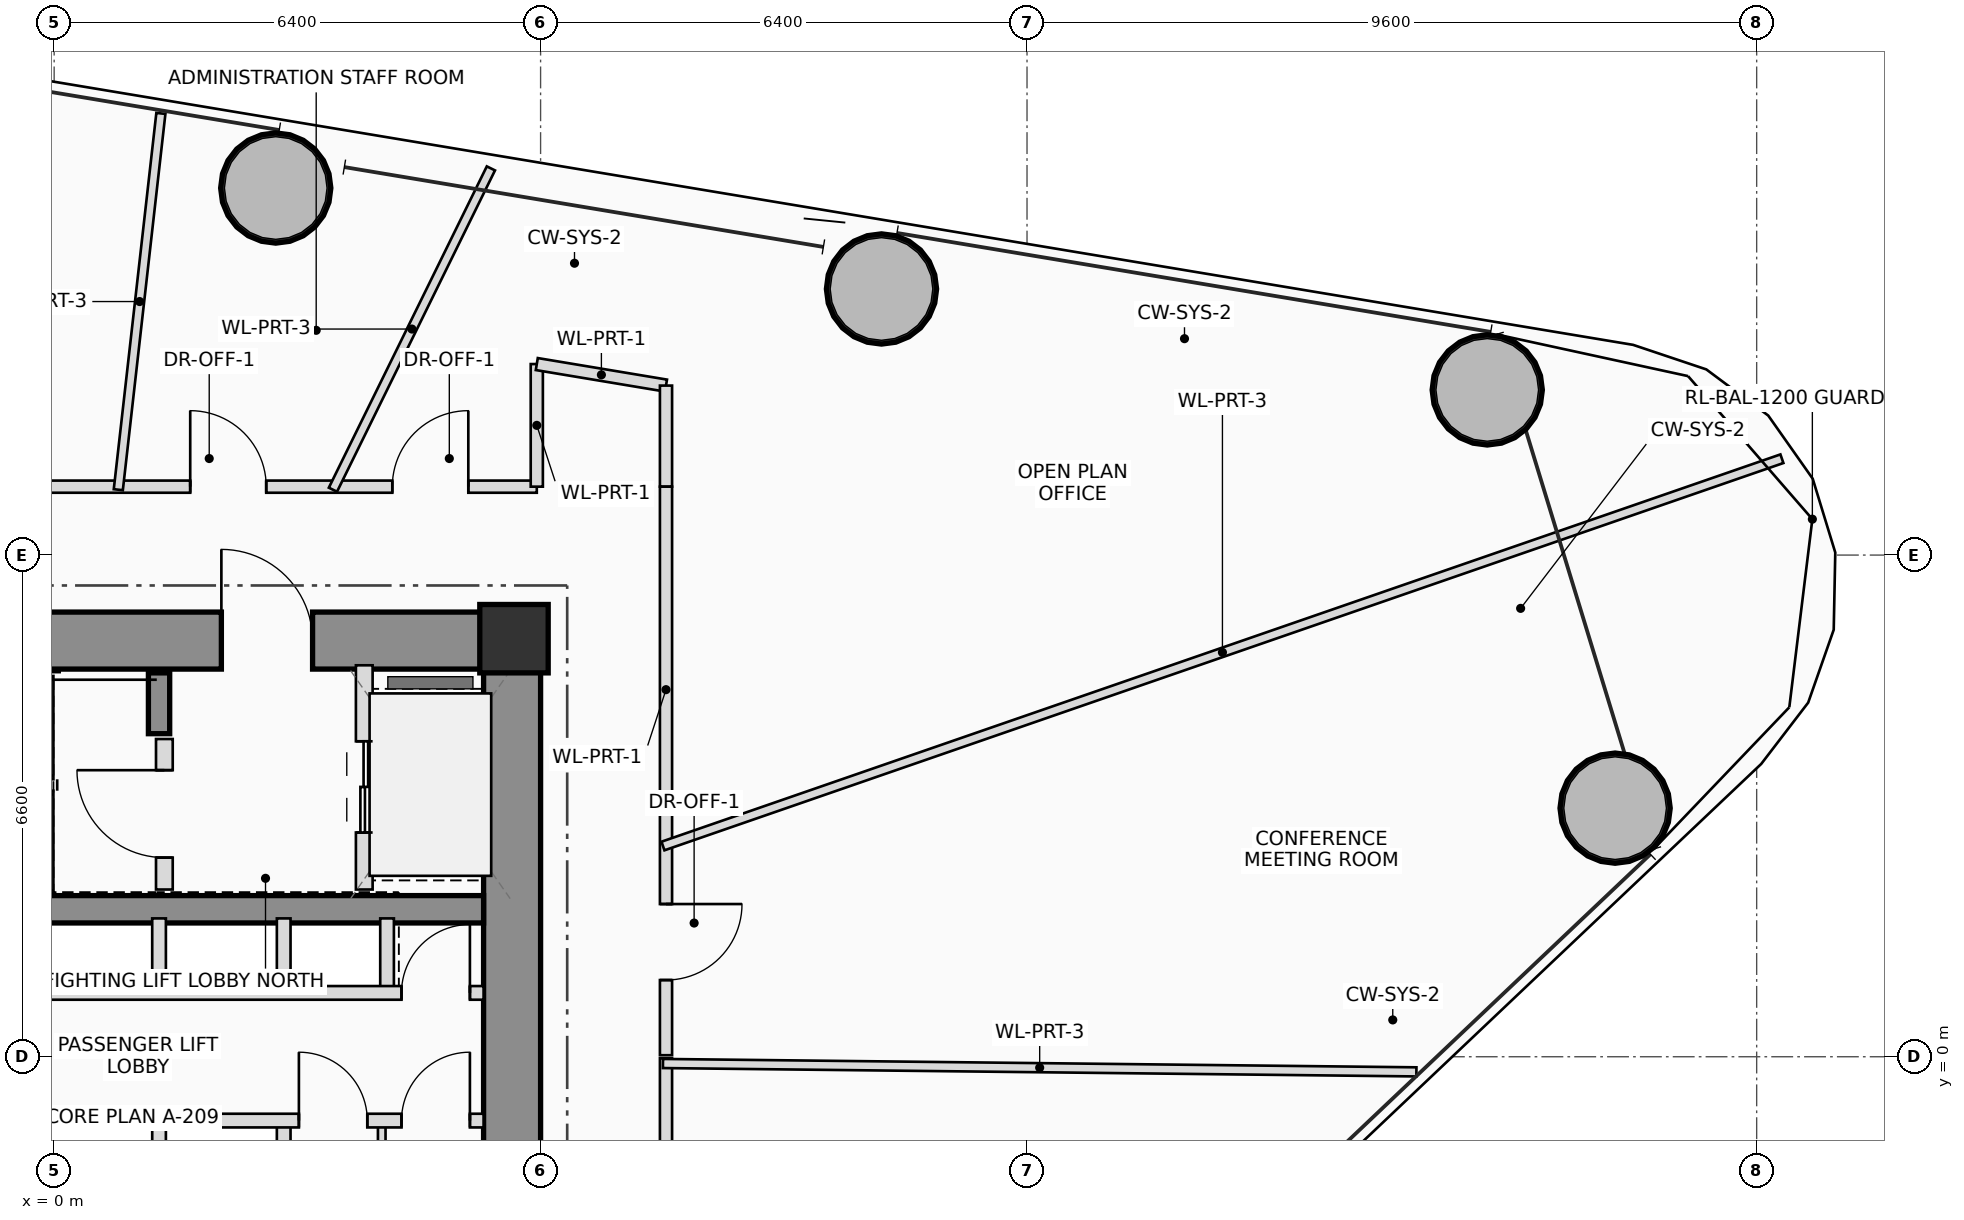
"""IFC4 building model, lengths in metres.
Left out: names, types, materials, properties, quantities, classifications, styles, units other than length and angle.
Written with IfcOpenShell. Run it as: python <this file> out.ifc"""

import sys

from ifc_helpers import new_model, si_unit, direction, frame, frame_2d, origin, origin_2d, place, context, subcontext, project, spatial, rectangle, hollow_circle, extrude, source, transform, mapped, element, fill, save


model = new_model("IFC4")
c1 = context("Model", 3, precision=1e-05, world=origin(), true_north=direction((0.0, 1.0)))
c2 = subcontext(c1, "Body", "Model", "MODEL_VIEW")
j1 = project(units=[si_unit("LENGTHUNIT", "METRE"), si_unit("PLANEANGLEUNIT", "RADIAN")], contexts=[c1])
p1 = place(None, origin())
s1 = spatial("IfcSite", under=j1, at=p1, CompositionType="ELEMENT")
p2 = place(p1, origin())
s2 = spatial("IfcBuilding", under=s1, at=p2, CompositionType="ELEMENT")
p3 = place(p2, frame((0.0, 0.0, 89.9)))
s3 = spatial("IfcBuildingStorey", under=s2, at=p3, CompositionType="ELEMENT", Elevation=89.9)
m1 = source(origin(), c2, "Body", "SweptSolid", [
    extrude(rectangle(XDim=0.9, YDim=0.9, at=origin_2d()), origin(), (0.0, 0.0, 1.0), 3.75),
])
p4 = place(p3, frame((6.05, 5.5, 0.0), z_axis=(0.0, 0.0, 1.0), x_axis=(1.0, 0.0, 0.0)))
e1 = element("IfcColumn", 1, at=p4, inside=s3, PredefinedType="COLUMN", context=c2, shape_type="MappedRepresentation", body=[
    mapped(m1, transform((0.0, 0.0, 0.0), scale=1.0)),
])
p5 = place(p3, frame((-6.4, 5.475, 0.0), z_axis=(0.0, 0.0, 1.0), x_axis=(1.0, 0.0, 0.0)))
e2 = element("IfcWall", 2, at=p5, inside=s3, PredefinedType="SHEAR", context=c2, shape_type="SweptSolid", body=[
    extrude(rectangle(XDim=12.8, YDim=0.75, at=frame_2d((6.4, 0.0))), origin(), (0.0, 0.0, 1.0), 3.75),
])
p6 = place(p5, frame((8.6, 0.0, 0.0)))
e3 = element("IfcOpeningElement", 3, at=p6, cuts=e2, PredefinedType="OPENING", context=c2, shape_type="SweptSolid", body=[
    extrude(rectangle(XDim=1.2, YDim=2.2, at=frame_2d((0.6, 1.1))), frame((0.0, 0.385, 0.0), z_axis=(0.0, -1.0, 0.0), x_axis=(1.0, 0.0, 0.0)), (0.0, 0.0, 1.0), 0.77),
])
p7 = place(p3, frame((6.025, -5.1, 0.0), z_axis=(0.0, 0.0, 1.0), x_axis=(0.0, 1.0, 0.0)))
e4 = element("IfcWall", 4, at=p7, inside=s3, PredefinedType="SHEAR", context=c2, shape_type="SweptSolid", body=[
    extrude(rectangle(XDim=10.2, YDim=0.75, at=frame_2d((5.1, 0.0))), origin(), (0.0, 0.0, 1.0), 3.75),
])
p8 = place(p3, frame((-5.65, 1.94, 0.0), z_axis=(0.0, 0.0, 1.0), x_axis=(1.0, 0.0, 0.0)))
e5 = element("IfcWall", 5, at=p8, inside=s3, PredefinedType="SHEAR", context=c2, shape_type="SweptSolid", body=[
    extrude(rectangle(XDim=11.3, YDim=0.36, at=frame_2d((5.65, 0.0))), origin(), (0.0, 0.0, 1.0), 3.75),
])
p9 = place(p3, frame((1.38, 4.25, 0.0), z_axis=(0.0, 0.0, 1.0), x_axis=(0.0, 1.0, 0.0)))
e6 = element("IfcWall", 6, at=p9, inside=s3, PredefinedType="SHEAR", context=c2, shape_type="SweptSolid", body=[
    extrude(rectangle(XDim=0.8, YDim=0.28, at=frame_2d((0.4, 0.0))), origin(), (0.0, 0.0, 1.0), 3.75),
])
m2 = source(origin(), c2, "Body", "SweptSolid", [
    extrude(hollow_circle(Radius=0.725, WallThickness=0.05, at=origin_2d()), origin(), (0.0, 0.0, 1.0), 3.75),
])
for number, where, z_axis, x_axis in (
    (7, (20.538, 3.271, 0.0), (0.0, 0.0, 1.0), (1.0, 0.0, 0.0)),
    (8, (18.855, 8.773, 0.0), (0.0, 0.0, 1.0), (1.0, 0.0, 0.0)),
    (9, (10.885, 10.101, 0.0), (0.0, 0.0, 1.0), (1.0, 0.0, 0.0)),
    (10, (2.915, 11.429, 0.0), (0.0, 0.0, 1.0), (1.0, 0.0, 0.0)),
):
    element("IfcColumn", number, at=place(p3, frame(where, z_axis=z_axis, x_axis=x_axis)), inside=s3, PredefinedType="COLUMN", context=c2, shape_type="MappedRepresentation", body=[
        mapped(m2, transform((0.0, 0.0, 0.0), scale=1.0)),
    ])
p10 = place(p3, frame((1.45, 2.2, 0.0), z_axis=(0.0, 0.0, 1.0), x_axis=(0.0, 1.0, 0.0)))
e11 = element("IfcWall", 11, at=p10, inside=s3, PredefinedType="PLUMBINGWALL", context=c2, shape_type="SweptSolid", body=[
    extrude(rectangle(XDim=1.98, YDim=0.22, at=frame_2d((0.99, 0.0))), origin(), (0.0, 0.0, 1.0), 3.545),
])
p11 = place(p10, frame((0.42, 0.0, 0.0)))
e12 = element("IfcOpeningElement", 12, at=p11, cuts=e11, PredefinedType="OPENING", context=c2, shape_type="SweptSolid", body=[
    extrude(rectangle(XDim=1.15, YDim=2.15, at=frame_2d((0.575, 1.075))), frame((0.0, 0.12, 0.0), z_axis=(0.0, -1.0, 0.0), x_axis=(1.0, 0.0, 0.0)), (0.0, 0.0, 1.0), 0.24),
])
p12 = place(p3, frame((4.08, 2.2, 0.0), z_axis=(0.0, 0.0, 1.0), x_axis=(0.0, 1.0, 0.0)))
e13 = element("IfcWall", 13, at=p12, inside=s3, PredefinedType="PLUMBINGWALL", context=c2, shape_type="SweptSolid", body=[
    extrude(rectangle(XDim=2.95, YDim=0.22, at=frame_2d((1.475, 0.0))), origin(), (0.0, 0.0, 1.0), 3.545),
])
p13 = place(p12, frame((0.75, 0.0, 0.0)))
e14 = element("IfcOpeningElement", 14, at=p13, cuts=e13, PredefinedType="OPENING", context=c2, shape_type="SweptSolid", body=[
    extrude(rectangle(XDim=1.2, YDim=2.25, at=frame_2d((0.6, 1.125))), frame((0.0, 0.12, 0.0), z_axis=(0.0, -1.0, 0.0), x_axis=(1.0, 0.0, 0.0)), (0.0, 0.0, 1.0), 0.24),
])
for number, where, z_axis, x_axis in (
    (15, (1.38, 0.84, 0.0), (0.0, 0.0, 1.0), (0.0, 1.0, 0.0)),
    (16, (1.38, -1.82, 0.0), (0.0, 0.0, 1.0), (0.0, 1.0, 0.0)),
    (17, (3.02, 0.84, 0.0), (0.0, 0.0, 1.0), (0.0, 1.0, 0.0)),
    (18, (4.38, 0.84, 0.0), (0.0, 0.0, 1.0), (0.0, 1.0, 0.0)),
    (19, (3.02, -1.82, 0.0), (0.0, 0.0, 1.0), (0.0, 1.0, 0.0)),
):
    element("IfcWall", number, at=place(p3, frame(where, z_axis=z_axis, x_axis=x_axis)), inside=s3, PredefinedType="PLUMBINGWALL", context=c2, shape_type="SweptSolid", body=[
        extrude(rectangle(XDim=0.98, YDim=0.18, at=frame_2d((0.49, 0.0))), origin(), (0.0, 0.0, 1.0), 3.545),
    ])
p14 = place(p3, frame((4.31, -1.82, 0.0), z_axis=(0.0, 0.0, 1.0), x_axis=(0.0, 1.0, 0.0)))
e20 = element("IfcWall", 20, at=p14, inside=s3, PredefinedType="PARTITIONING", context=c2, shape_type="SweptSolid", body=[
    extrude(rectangle(XDim=0.98, YDim=0.1, at=frame_2d((0.49, 0.0))), origin(), (0.0, 0.0, 1.0), 3.545),
])
p15 = place(p3, frame((-5.68, 0.84, 0.0), z_axis=(0.0, 0.0, 1.0), x_axis=(1.0, 0.0, 0.0)))
e21 = element("IfcWall", 21, at=p15, inside=s3, PredefinedType="PLUMBINGWALL", context=c2, shape_type="SweptSolid", body=[
    extrude(rectangle(XDim=11.33, YDim=0.18, at=frame_2d((5.665, 0.0))), origin(), (0.0, 0.0, 1.0), 3.545),
])
p16 = place(p15, frame((0.43, 0.0, 0.0)))
e22 = element("IfcOpeningElement", 22, at=p16, cuts=e21, PredefinedType="OPENING", context=c2, shape_type="SweptSolid", body=[
    extrude(rectangle(XDim=1.1, YDim=2.2, at=frame_2d((0.55, 1.1))), frame((0.0, 0.1, 0.0), z_axis=(0.0, -1.0, 0.0), x_axis=(1.0, 0.0, 0.0)), (0.0, 0.0, 1.0), 0.2),
])
p17 = place(p15, frame((2.13, 0.0, 0.0)))
e23 = element("IfcOpeningElement", 23, at=p17, cuts=e21, PredefinedType="OPENING", context=c2, shape_type="SweptSolid", body=[
    extrude(rectangle(XDim=1.1, YDim=2.2, at=frame_2d((0.55, 1.1))), frame((0.0, 0.1, 0.0), z_axis=(0.0, -1.0, 0.0), x_axis=(1.0, 0.0, 0.0)), (0.0, 0.0, 1.0), 0.2),
])
p18 = place(p15, frame((10.25, 0.0, 0.0)))
e24 = element("IfcOpeningElement", 24, at=p18, cuts=e21, PredefinedType="OPENING", context=c2, shape_type="SweptSolid", body=[
    extrude(rectangle(XDim=0.9, YDim=2.05, at=frame_2d((0.45, 1.025))), frame((0.0, 0.1, 0.0), z_axis=(0.0, -1.0, 0.0), x_axis=(1.0, 0.0, 0.0)), (0.0, 0.0, 1.0), 0.2),
])
p19 = place(p3, frame((-5.68, -0.84, 0.0), z_axis=(0.0, 0.0, 1.0), x_axis=(1.0, 0.0, 0.0)))
e25 = element("IfcWall", 25, at=p19, inside=s3, PredefinedType="PLUMBINGWALL", context=c2, shape_type="SweptSolid", body=[
    extrude(rectangle(XDim=11.33, YDim=0.18, at=frame_2d((5.665, 0.0))), origin(), (0.0, 0.0, 1.0), 3.545),
])
p20 = place(p19, frame((0.43, 0.0, 0.0)))
e26 = element("IfcOpeningElement", 26, at=p20, cuts=e25, PredefinedType="OPENING", context=c2, shape_type="SweptSolid", body=[
    extrude(rectangle(XDim=1.1, YDim=2.2, at=frame_2d((0.55, 1.1))), frame((0.0, 0.1, 0.0), z_axis=(0.0, -1.0, 0.0), x_axis=(1.0, 0.0, 0.0)), (0.0, 0.0, 1.0), 0.2),
])
p21 = place(p19, frame((2.13, 0.0, 0.0)))
e27 = element("IfcOpeningElement", 27, at=p21, cuts=e25, PredefinedType="OPENING", context=c2, shape_type="SweptSolid", body=[
    extrude(rectangle(XDim=1.1, YDim=2.2, at=frame_2d((0.55, 1.1))), frame((0.0, 0.1, 0.0), z_axis=(0.0, -1.0, 0.0), x_axis=(1.0, 0.0, 0.0)), (0.0, 0.0, 1.0), 0.2),
])
p22 = place(p19, frame((8.9, 0.0, 0.0)))
e28 = element("IfcOpeningElement", 28, at=p22, cuts=e25, PredefinedType="OPENING", context=c2, shape_type="SweptSolid", body=[
    extrude(rectangle(XDim=0.9, YDim=2.05, at=frame_2d((0.45, 1.025))), frame((0.0, 0.1, 0.0), z_axis=(0.0, -1.0, 0.0), x_axis=(1.0, 0.0, 0.0)), (0.0, 0.0, 1.0), 0.2),
])
p23 = place(p19, frame((10.25, 0.0, 0.0)))
e29 = element("IfcOpeningElement", 29, at=p23, cuts=e25, PredefinedType="OPENING", context=c2, shape_type="SweptSolid", body=[
    extrude(rectangle(XDim=0.9, YDim=2.05, at=frame_2d((0.45, 1.025))), frame((0.0, 0.1, 0.0), z_axis=(0.0, -1.0, 0.0), x_axis=(1.0, 0.0, 0.0)), (0.0, 0.0, 1.0), 0.2),
])
p24 = place(p3, frame((-6.35, 7.5, 0.0), z_axis=(0.0, 0.0, 1.0), x_axis=(1.0, 0.0, 0.0)))
e30 = element("IfcWall", 30, at=p24, inside=s3, PredefinedType="PARTITIONING", context=c2, shape_type="SweptSolid", body=[
    extrude(rectangle(XDim=12.7, YDim=0.16, at=frame_2d((6.35, 0.0))), origin(), (0.0, 0.0, 1.0), 2.85),
])
p25 = place(p24, frame((8.14, 0.0, 0.0)))
e31 = element("IfcOpeningElement", 31, at=p25, cuts=e30, PredefinedType="OPENING", context=c2, shape_type="SweptSolid", body=[
    extrude(rectangle(XDim=1.0, YDim=2.25, at=frame_2d((0.5, 1.125))), frame((0.0, 0.09, 0.0), z_axis=(0.0, -1.0, 0.0), x_axis=(1.0, 0.0, 0.0)), (0.0, 0.0, 1.0), 0.18),
])
p26 = place(p24, frame((10.799, 0.0, 0.0)))
e32 = element("IfcOpeningElement", 32, at=p26, cuts=e30, PredefinedType="OPENING", context=c2, shape_type="SweptSolid", body=[
    extrude(rectangle(XDim=1.0, YDim=2.25, at=frame_2d((0.5, 1.125))), frame((0.0, 0.09, 0.0), z_axis=(0.0, -1.0, 0.0), x_axis=(1.0, 0.0, 0.0)), (0.0, 0.0, 1.0), 0.18),
])
p27 = place(p3, frame((6.35, 7.5, 0.0), z_axis=(0.0, 0.0, 1.0), x_axis=(0.0, 1.0, 0.0)))
e33 = element("IfcWall", 33, at=p27, inside=s3, PredefinedType="PARTITIONING", context=c2, shape_type="SweptSolid", body=[
    extrude(rectangle(XDim=1.613, YDim=0.16, at=frame_2d((0.807, 0.0))), origin(), (0.0, 0.0, 1.0), 3.05),
])
p28 = place(p3, frame((6.35, 9.113, 0.0), z_axis=(0.0, 0.0, 1.0), x_axis=(0.986405407683, -0.164330069354, 0.0)))
e34 = element("IfcWall", 34, at=p28, inside=s3, PredefinedType="PARTITIONING", context=c2, shape_type="SweptSolid", body=[
    extrude(rectangle(XDim=1.723, YDim=0.16, at=frame_2d((0.862, 0.0))), origin(), (0.0, 0.0, 1.0), 3.2),
])
p29 = place(p3, frame((8.05, 8.83, 0.0), z_axis=(0.0, 0.0, 1.0), x_axis=(0.0, -1.0, 0.0)))
e35 = element("IfcWall", 35, at=p29, inside=s3, PredefinedType="PARTITIONING", context=c2, shape_type="SweptSolid", body=[
    extrude(rectangle(XDim=1.33, YDim=0.16, at=frame_2d((0.665, 0.0))), origin(), (0.0, 0.0, 1.0), 2.85),
])
p30 = place(p3, frame((8.05, 7.5, 0.0), z_axis=(0.0, 0.0, 1.0), x_axis=(0.0, -1.0, 0.0)))
e36 = element("IfcWall", 36, at=p30, inside=s3, PredefinedType="PARTITIONING", context=c2, shape_type="SweptSolid", body=[
    extrude(rectangle(XDim=7.48, YDim=0.16, at=frame_2d((3.74, 0.0))), origin(), (0.0, 0.0, 1.0), 2.85),
])
p31 = place(p30, frame((5.491, 0.0, 0.0)))
e37 = element("IfcOpeningElement", 37, at=p31, cuts=e36, PredefinedType="OPENING", context=c2, shape_type="SweptSolid", body=[
    extrude(rectangle(XDim=1.0, YDim=2.25, at=frame_2d((0.5, 1.125))), frame((0.0, 0.09, 0.0), z_axis=(0.0, -1.0, 0.0), x_axis=(1.0, 0.0, 0.0)), (0.0, 0.0, 1.0), 0.18),
])
p32 = place(p3, frame((8.05, -0.02, 0.0), z_axis=(0.0, 0.0, 1.0), x_axis=(0.0, -1.0, 0.0)))
e38 = element("IfcWall", 38, at=p32, inside=s3, PredefinedType="PARTITIONING", context=c2, shape_type="SweptSolid", body=[
    extrude(rectangle(XDim=6.174, YDim=0.16, at=frame_2d((3.087, 0.0))), origin(), (0.0, 0.0, 1.0), 2.85),
])
p33 = place(p32, frame((2.587, 0.0, 0.0)))
e39 = element("IfcOpeningElement", 39, at=p33, cuts=e38, PredefinedType="OPENING", context=c2, shape_type="SweptSolid", body=[
    extrude(rectangle(XDim=1.0, YDim=2.25, at=frame_2d((0.5, 1.125))), frame((0.0, 0.09, 0.0), z_axis=(0.0, -1.0, 0.0), x_axis=(1.0, 0.0, 0.0)), (0.0, 0.0, 1.0), 0.18),
])
p34 = place(p3, frame((8.01, -0.089, 0.0), z_axis=(0.0, 0.0, 1.0), x_axis=(0.999938319872, -0.011106594972, 0.0)))
e40 = element("IfcWall", 40, at=p34, inside=s3, PredefinedType="PARTITIONING", context=c2, shape_type="SweptSolid", body=[
    extrude(rectangle(XDim=9.914, YDim=0.12, at=frame_2d((4.957, 0.0))), origin(), (0.0, 0.0, 1.0), 2.85),
])
p35 = place(p3, frame((8.01, 2.772, 0.0), z_axis=(0.0, 0.0, 1.0), x_axis=(0.944999487284, 0.327071810207, 0.0)))
e41 = element("IfcWall", 41, at=p35, inside=s3, PredefinedType="PARTITIONING", context=c2, shape_type="SweptSolid", body=[
    extrude(rectangle(XDim=15.579, YDim=0.12, at=frame_2d((7.79, 0.0))), origin(), (0.0, 0.0, 1.0), 3.01),
])
p36 = place(p3, frame((3.668, 7.46, 0.0), z_axis=(0.0, 0.0, 1.0), x_axis=(0.441212238914, 0.897402785951, 0.0)))
e42 = element("IfcWall", 42, at=p36, inside=s3, PredefinedType="PARTITIONING", context=c2, shape_type="SweptSolid", body=[
    extrude(rectangle(XDim=4.711, YDim=0.12, at=frame_2d((2.355, 0.0))), origin(), (0.0, 0.0, 1.0), 2.85),
])
p37 = place(p3, frame((0.844, 7.46, 0.0), z_axis=(0.0, 0.0, 1.0), x_axis=(0.112405035284, 0.99366247189, 0.0)))
e43 = element("IfcWall", 43, at=p37, inside=s3, PredefinedType="PARTITIONING", context=c2, shape_type="SweptSolid", body=[
    extrude(rectangle(XDim=4.982, YDim=0.12, at=frame_2d((2.491, 0.0))), origin(), (0.0, 0.0, 1.0), 3.01),
])
p38 = place(p6, origin())
e44 = element("IfcDoor", 44, at=p38, inside=s3, OperationType="SINGLE_SWING_LEFT", PredefinedType="DOOR", context=c2, shape_type="SweptSolid", body=[
    extrude(rectangle(XDim=1.2, YDim=2.2, at=frame_2d((0.6, 1.1))), frame((0.0, 0.025, 0.0), z_axis=(0.0, -1.0, 0.0), x_axis=(1.0, 0.0, 0.0)), (0.0, 0.0, 1.0), 0.05),
])
fill(e3, e44)
p39 = place(p11, origin())
e45 = element("IfcDoor", 45, at=p39, inside=s3, OperationType="SINGLE_SWING_RIGHT", PredefinedType="DOOR", context=c2, shape_type="SweptSolid", body=[
    extrude(rectangle(XDim=1.15, YDim=2.15, at=frame_2d((0.575, 1.075))), frame((0.0, 0.025, 0.0), z_axis=(0.0, -1.0, 0.0), x_axis=(1.0, 0.0, 0.0)), (0.0, 0.0, 1.0), 0.05),
])
fill(e12, e45)
p40 = place(p13, origin())
e46 = element("IfcDoor", 46, at=p40, inside=s3, OperationType="DOUBLE_DOOR_SLIDING", PredefinedType="DOOR", context=c2, shape_type="SweptSolid", body=[
    extrude(rectangle(XDim=1.2, YDim=2.25, at=frame_2d((0.6, 1.125))), frame((0.0, 0.025, 0.0), z_axis=(0.0, -1.0, 0.0), x_axis=(1.0, 0.0, 0.0)), (0.0, 0.0, 1.0), 0.05),
])
fill(e14, e46)
p41 = place(p18, origin())
e47 = element("IfcDoor", 47, at=p41, inside=s3, OperationType="SINGLE_SWING_RIGHT", PredefinedType="DOOR", context=c2, shape_type="SweptSolid", body=[
    extrude(rectangle(XDim=0.9, YDim=2.05, at=frame_2d((0.45, 1.025))), frame((0.0, 0.025, 0.0), z_axis=(0.0, -1.0, 0.0), x_axis=(1.0, 0.0, 0.0)), (0.0, 0.0, 1.0), 0.05),
])
fill(e24, e47)
p42 = place(p22, origin())
e48 = element("IfcDoor", 48, at=p42, inside=s3, OperationType="SINGLE_SWING_LEFT", PredefinedType="DOOR", context=c2, shape_type="SweptSolid", body=[
    extrude(rectangle(XDim=0.9, YDim=2.05, at=frame_2d((0.45, 1.025))), frame((0.0, 0.025, 0.0), z_axis=(0.0, -1.0, 0.0), x_axis=(1.0, 0.0, 0.0)), (0.0, 0.0, 1.0), 0.05),
])
fill(e28, e48)
p43 = place(p23, origin())
e49 = element("IfcDoor", 49, at=p43, inside=s3, OperationType="SINGLE_SWING_RIGHT", PredefinedType="DOOR", context=c2, shape_type="SweptSolid", body=[
    extrude(rectangle(XDim=0.9, YDim=2.05, at=frame_2d((0.45, 1.025))), frame((0.0, 0.025, 0.0), z_axis=(0.0, -1.0, 0.0), x_axis=(1.0, 0.0, 0.0)), (0.0, 0.0, 1.0), 0.05),
])
fill(e29, e49)
p44 = place(p25, origin())
e50 = element("IfcDoor", 50, at=p44, inside=s3, OperationType="SINGLE_SWING_LEFT", PredefinedType="DOOR", context=c2, shape_type="SweptSolid", body=[
    extrude(rectangle(XDim=1.0, YDim=2.25, at=frame_2d((0.5, 1.125))), frame((0.0, 0.025, 0.0), z_axis=(0.0, -1.0, 0.0), x_axis=(1.0, 0.0, 0.0)), (0.0, 0.0, 1.0), 0.05),
])
fill(e31, e50)
p45 = place(p26, origin())
e51 = element("IfcDoor", 51, at=p45, inside=s3, OperationType="SINGLE_SWING_RIGHT", PredefinedType="DOOR", context=c2, shape_type="SweptSolid", body=[
    extrude(rectangle(XDim=1.0, YDim=2.25, at=frame_2d((0.5, 1.125))), frame((0.0, 0.025, 0.0), z_axis=(0.0, -1.0, 0.0), x_axis=(1.0, 0.0, 0.0)), (0.0, 0.0, 1.0), 0.05),
])
fill(e32, e51)
p46 = place(p31, origin())
e52 = element("IfcDoor", 52, at=p46, inside=s3, OperationType="SINGLE_SWING_LEFT", PredefinedType="DOOR", context=c2, shape_type="SweptSolid", body=[
    extrude(rectangle(XDim=1.0, YDim=2.25, at=frame_2d((0.5, 1.125))), frame((0.0, 0.025, 0.0), z_axis=(0.0, -1.0, 0.0), x_axis=(1.0, 0.0, 0.0)), (0.0, 0.0, 1.0), 0.05),
])
fill(e37, e52)
save(model, sys.argv[1])
